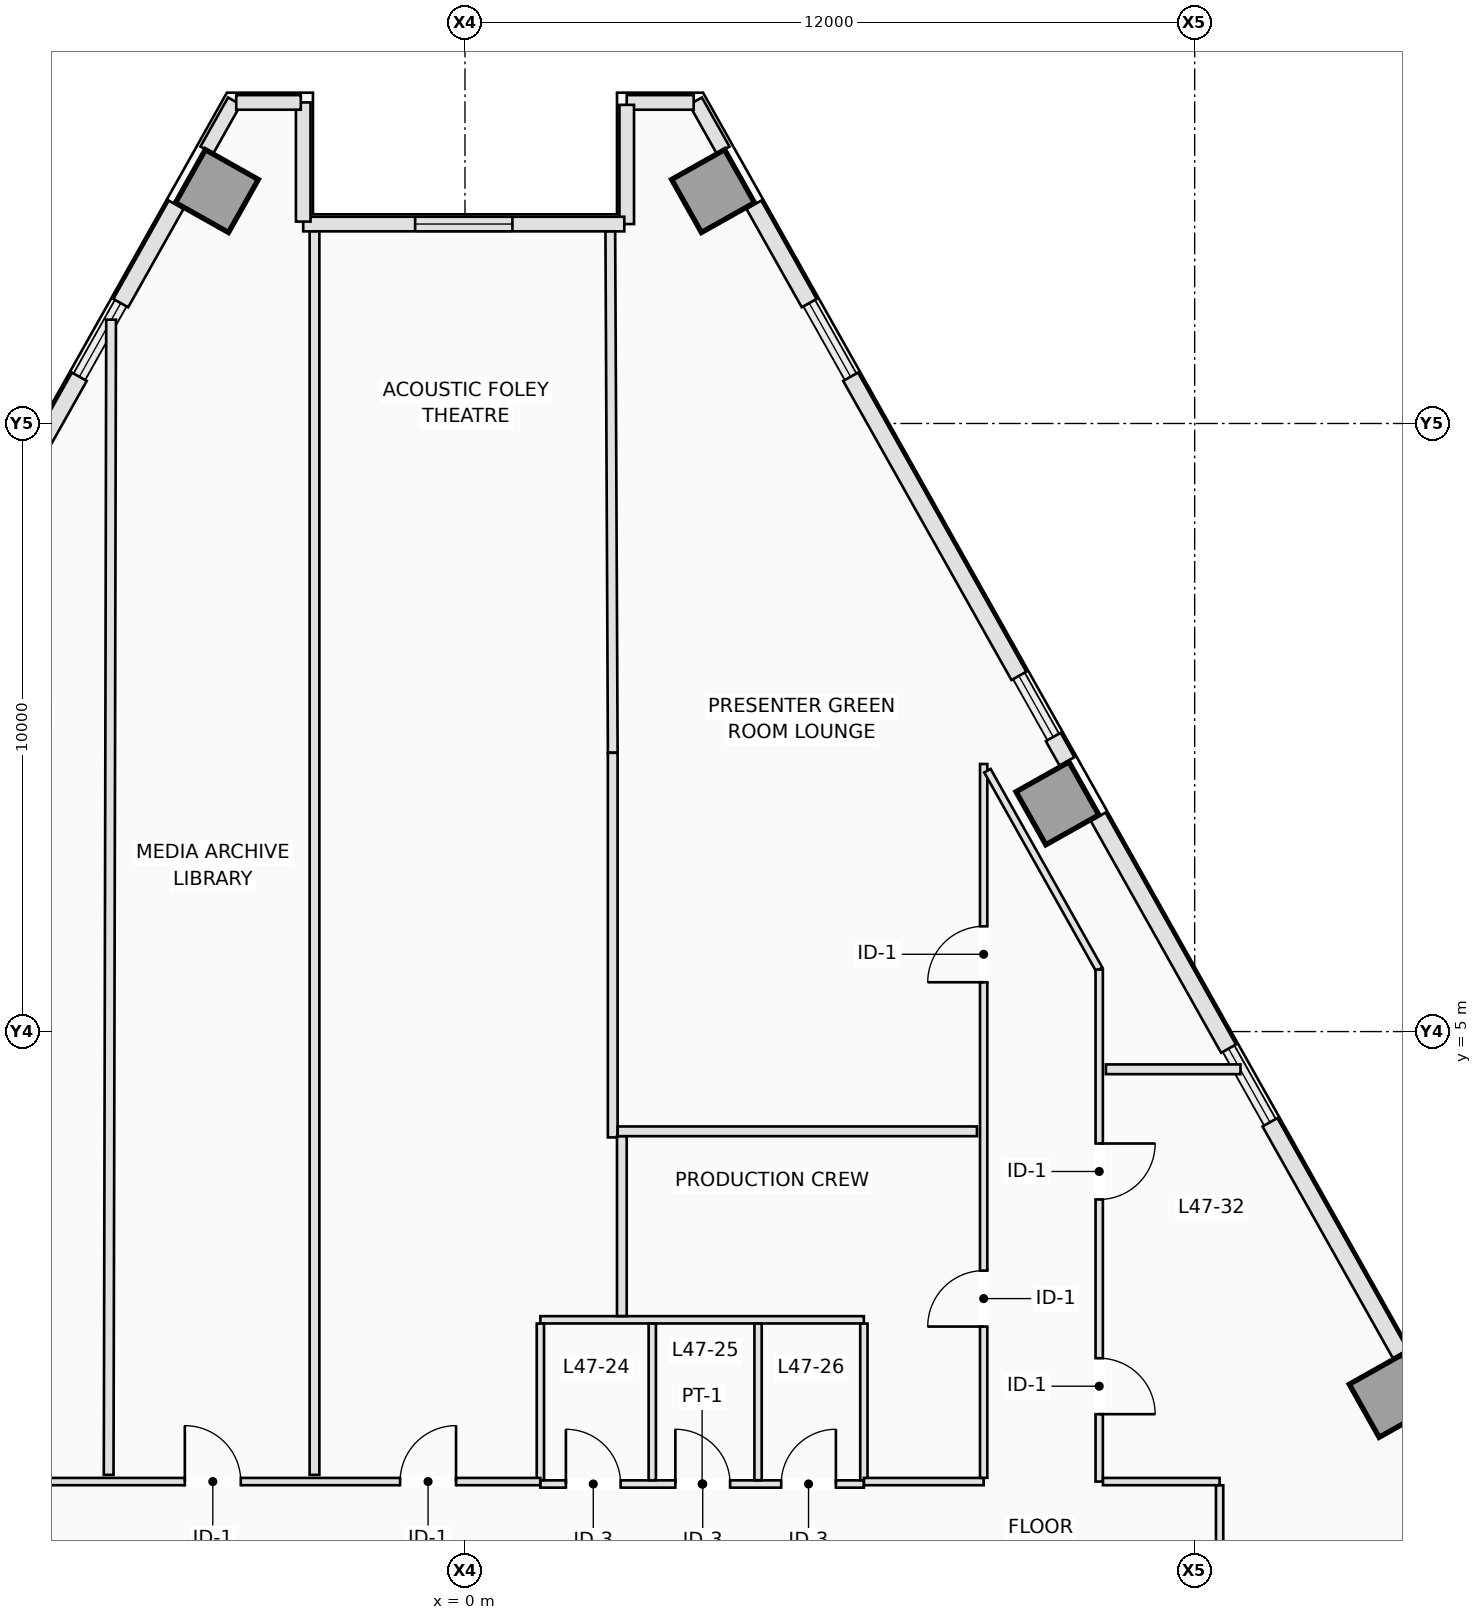
"""IFC4 building model, lengths in metres.
Left out: names, types, materials, properties, quantities, classifications, styles, units other than length and angle.
Written with IfcOpenShell. Run it as: python <this file> out.ifc"""

import sys

from ifc_helpers import new_model, si_unit, direction, frame, frame_2d, origin, origin_2d, place, context, subcontext, project, spatial, rectangle, extrude, element, fill, save


model = new_model("IFC4")
c1 = context("Model", 3, precision=1e-05, world=origin(), true_north=direction((0.0, 1.0)))
c2 = subcontext(c1, "Body", "Model", "MODEL_VIEW")
j1 = project(units=[si_unit("LENGTHUNIT", "METRE"), si_unit("PLANEANGLEUNIT", "RADIAN")], contexts=[c1])
p1 = place(None, origin())
s1 = spatial("IfcSite", under=j1, at=p1, CompositionType="ELEMENT")
p2 = place(p1, origin())
s2 = spatial("IfcBuilding", under=s1, at=p2, CompositionType="ELEMENT")
p3 = place(p2, frame((0.0, 0.0, 172.0)))
s3 = spatial("IfcBuildingStorey", under=s2, at=p3, CompositionType="ELEMENT", Elevation=172.0)
for number, where, z_axis, x_axis in (
    (1, (15.224, -0.991, 0.0), (0.0, 0.0, 1.0), (0.872, 0.49, 0.0)),
    (2, (9.743, 8.753, 0.0), (0.0, 0.0, 1.0), (0.872, 0.49, 0.0)),
    (3, (4.079, 18.822, 0.0), (0.0, 0.0, 1.0), (0.872, 0.49, 0.0)),
    (4, (-4.079, 18.822, 0.0), (0.0, 0.0, 1.0), (-0.872, 0.49, 0.0)),
):
    element("IfcColumn", number, at=place(p3, frame(where, z_axis=z_axis, x_axis=x_axis)), inside=s3, PredefinedType="COLUMN", context=c2, shape_type="SweptSolid", body=[
        extrude(rectangle(XDim=1.0, YDim=1.0, at=origin_2d()), origin(), (0.0, 0.0, 1.0), 3.5),
    ])
p4 = place(p3, frame((3.792, 20.302, 0.0), z_axis=(0.0, 0.0, 1.0), x_axis=(0.490048346303, -0.871695255399, 0.0)))
e5 = element("IfcWall", 5, at=p4, inside=s3, PredefinedType="STANDARD", context=c2, shape_type="SweptSolid", body=[
    extrude(rectangle(XDim=0.926, YDim=0.24, at=frame_2d((0.463, 0.0))), origin(), (0.0, 0.0, 1.0), 3.25),
])
p5 = place(p3, frame((4.751, 18.597, 0.0), z_axis=(0.0, 0.0, 1.0), x_axis=(0.490248749158, -0.871582562899, 0.0)))
e6 = element("IfcWall", 6, at=p5, inside=s3, PredefinedType="STANDARD", context=c2, shape_type="SweptSolid", body=[
    extrude(rectangle(XDim=1.856, YDim=0.28, at=frame_2d((0.928, 0.0))), origin(), (0.0, 0.0, 1.0), 3.25),
])
p6 = place(p3, frame((6.342, 15.768, 0.0), z_axis=(0.0, 0.0, 1.0), x_axis=(0.490289995219, -0.871559361483, 0.0)))
e7 = element("IfcWall", 7, at=p6, inside=s3, PredefinedType="STANDARD", context=c2, shape_type="SweptSolid", body=[
    extrude(rectangle(XDim=5.643, YDim=0.28, at=frame_2d((2.822, 0.0))), origin(), (0.0, 0.0, 1.0), 3.25),
])
p7 = place(p3, frame((9.674, 9.845, 0.0), z_axis=(0.0, 0.0, 1.0), x_axis=(0.490412424957, -0.871490478116, 0.0)))
e8 = element("IfcWall", 8, at=p7, inside=s3, PredefinedType="STANDARD", context=c2, shape_type="SweptSolid", body=[
    extrude(rectangle(XDim=0.46, YDim=0.28, at=frame_2d((0.23, 0.0))), origin(), (0.0, 0.0, 1.0), 3.25),
])
p8 = place(p3, frame((10.412, 8.533, 0.0), z_axis=(0.0, 0.0, 1.0), x_axis=(0.490274486291, -0.871568085747, 0.0)))
e9 = element("IfcWall", 9, at=p8, inside=s3, PredefinedType="STANDARD", context=c2, shape_type="SweptSolid", body=[
    extrude(rectangle(XDim=4.375, YDim=0.28, at=frame_2d((2.188, 0.0))), origin(), (0.0, 0.0, 1.0), 3.25),
])
p9 = place(p3, frame((13.238, 3.509, 0.0), z_axis=(0.0, 0.0, 1.0), x_axis=(0.490232095789, -0.871591929895, 0.0)))
e10 = element("IfcWall", 10, at=p9, inside=s3, PredefinedType="STANDARD", context=c2, shape_type="SweptSolid", body=[
    extrude(rectangle(XDim=4.375, YDim=0.28, at=frame_2d((2.188, 0.0))), origin(), (0.0, 0.0, 1.0), 3.25),
])
p10 = place(p3, frame((-4.246, 19.495, 0.0), z_axis=(0.0, 0.0, 1.0), x_axis=(0.490048346303, 0.871695255399, 0.0)))
e11 = element("IfcWall", 11, at=p10, inside=s3, PredefinedType="STANDARD", context=c2, shape_type="SweptSolid", body=[
    extrude(rectangle(XDim=0.926, YDim=0.24, at=frame_2d((0.463, 0.0))), origin(), (0.0, 0.0, 1.0), 3.25),
])
p11 = place(p3, frame((-9.109, 10.85, 0.0), z_axis=(0.0, 0.0, 1.0), x_axis=(0.490289995219, 0.871559361483, 0.0)))
e12 = element("IfcWall", 12, at=p11, inside=s3, PredefinedType="STANDARD", context=c2, shape_type="SweptSolid", body=[
    extrude(rectangle(XDim=5.643, YDim=0.28, at=frame_2d((2.822, 0.0))), origin(), (0.0, 0.0, 1.0), 3.25),
])
p12 = place(p3, frame((-5.661, 16.98, 0.0), z_axis=(0.0, 0.0, 1.0), x_axis=(0.490248749158, 0.871582562899, 0.0)))
e13 = element("IfcWall", 13, at=p12, inside=s3, PredefinedType="STANDARD", context=c2, shape_type="SweptSolid", body=[
    extrude(rectangle(XDim=1.856, YDim=0.28, at=frame_2d((0.928, 0.0))), origin(), (0.0, 0.0, 1.0), 3.25),
])
p13 = place(p3, frame((3.761, 20.28, 0.0), z_axis=(0.0, 0.0, 1.0), x_axis=(-1.0, 0.0, 0.0)))
e14 = element("IfcWall", 14, at=p13, inside=s3, PredefinedType="STANDARD", context=c2, shape_type="SweptSolid", body=[
    extrude(rectangle(XDim=1.102, YDim=0.24, at=frame_2d((0.551, 0.0))), origin(), (0.0, 0.0, 1.0), 3.25),
])
p14 = place(p3, frame((2.66, 20.24, 0.0), z_axis=(0.0, 0.0, 1.0), x_axis=(0.0, -1.0, 0.0)))
e15 = element("IfcWall", 15, at=p14, inside=s3, PredefinedType="STANDARD", context=c2, shape_type="SweptSolid", body=[
    extrude(rectangle(XDim=1.96, YDim=0.24, at=frame_2d((0.98, 0.0))), origin(), (0.0, 0.0, 1.0), 3.25),
])
p15 = place(p3, frame((2.62, 18.28, 0.0), z_axis=(0.0, 0.0, 1.0), x_axis=(-1.0, 0.0, 0.0)))
e16 = element("IfcWall", 16, at=p15, inside=s3, PredefinedType="STANDARD", context=c2, shape_type="SweptSolid", body=[
    extrude(rectangle(XDim=5.28, YDim=0.24, at=frame_2d((2.64, 0.0))), origin(), (0.0, 0.0, 1.0), 3.25),
])
p16 = place(p15, frame((1.84, 0.0, 0.9)))
e17 = element("IfcOpeningElement", 17, at=p16, cuts=e16, PredefinedType="OPENING", context=c2, shape_type="SweptSolid", body=[
    extrude(rectangle(XDim=1.6, YDim=2.1, at=frame_2d((0.8, 1.05))), frame((0.0, 0.13, 0.0), z_axis=(0.0, -1.0, 0.0), x_axis=(1.0, 0.0, 0.0)), (0.0, 0.0, 1.0), 0.26),
])
p17 = place(p3, frame((-2.66, 18.32, 0.0), z_axis=(0.0, 0.0, 1.0), x_axis=(0.0, 1.0, 0.0)))
e18 = element("IfcWall", 18, at=p17, inside=s3, PredefinedType="STANDARD", context=c2, shape_type="SweptSolid", body=[
    extrude(rectangle(XDim=1.96, YDim=0.24, at=frame_2d((0.98, 0.0))), origin(), (0.0, 0.0, 1.0), 3.25),
])
p18 = place(p3, frame((-2.7, 20.28, 0.0), z_axis=(0.0, 0.0, 1.0), x_axis=(-1.0, 0.0, 0.0)))
e19 = element("IfcWall", 19, at=p18, inside=s3, PredefinedType="STANDARD", context=c2, shape_type="SweptSolid", body=[
    extrude(rectangle(XDim=1.062, YDim=0.24, at=frame_2d((0.531, 0.0))), origin(), (0.0, 0.0, 1.0), 3.25),
])
p19 = place(p3, frame((1.24, -2.44, 0.0), z_axis=(0.0, 0.0, 1.0), x_axis=(1.0, 0.0, 0.0)))
e20 = element("IfcWall", 20, at=p19, inside=s3, PredefinedType="PARTITIONING", context=c2, shape_type="SweptSolid", body=[
    extrude(rectangle(XDim=5.32, YDim=0.12, at=frame_2d((2.66, 0.0))), origin(), (0.0, 0.0, 1.0), 2.891),
])
p20 = place(p19, frame((0.42, 0.0, 0.0)))
e21 = element("IfcOpeningElement", 21, at=p20, cuts=e20, PredefinedType="OPENING", context=c2, shape_type="SweptSolid", body=[
    extrude(rectangle(XDim=0.9, YDim=2.12, at=frame_2d((0.45, 1.06))), frame((0.0, 0.07, 0.0), z_axis=(0.0, -1.0, 0.0), x_axis=(1.0, 0.0, 0.0)), (0.0, 0.0, 1.0), 0.14),
])
p21 = place(p19, frame((2.22, 0.0, 0.0)))
e22 = element("IfcOpeningElement", 22, at=p21, cuts=e20, PredefinedType="OPENING", context=c2, shape_type="SweptSolid", body=[
    extrude(rectangle(XDim=0.9, YDim=2.12, at=frame_2d((0.45, 1.06))), frame((0.0, 0.07, 0.0), z_axis=(0.0, -1.0, 0.0), x_axis=(1.0, 0.0, 0.0)), (0.0, 0.0, 1.0), 0.14),
])
p22 = place(p19, frame((3.96, 0.0, 0.0)))
e23 = element("IfcOpeningElement", 23, at=p22, cuts=e20, PredefinedType="OPENING", context=c2, shape_type="SweptSolid", body=[
    extrude(rectangle(XDim=0.9, YDim=2.12, at=frame_2d((0.45, 1.06))), frame((0.0, 0.07, 0.0), z_axis=(0.0, -1.0, 0.0), x_axis=(1.0, 0.0, 0.0)), (0.0, 0.0, 1.0), 0.14),
])
p23 = place(p3, frame((1.24, 0.26, 0.0), z_axis=(0.0, 0.0, 1.0), x_axis=(1.0, 0.0, 0.0)))
e24 = element("IfcWall", 24, at=p23, inside=s3, PredefinedType="PARTITIONING", context=c2, shape_type="SweptSolid", body=[
    extrude(rectangle(XDim=5.32, YDim=0.12, at=frame_2d((2.66, 0.0))), origin(), (0.0, 0.0, 1.0), 3.25),
])
for number, where, z_axis, x_axis in (
    (25, (1.24, -2.378, 0.0), (0.0, 0.0, 1.0), (0.0, 1.0, 0.0)),
    (26, (3.08, -2.378, 0.0), (0.0, 0.0, 1.0), (0.0, 1.0, 0.0)),
    (27, (4.82, -2.378, 0.0), (0.0, 0.0, 1.0), (0.0, 1.0, 0.0)),
    (28, (6.56, -2.378, 0.0), (0.0, 0.0, 1.0), (0.0, 1.0, 0.0)),
):
    element("IfcWall", number, at=place(p3, frame(where, z_axis=z_axis, x_axis=x_axis)), inside=s3, PredefinedType="PARTITIONING", context=c2, shape_type="SweptSolid", body=[
        extrude(rectangle(XDim=2.576, YDim=0.12, at=frame_2d((1.288, 0.0))), origin(), (0.0, 0.0, 1.0), 3.25),
    ])
p24 = place(p3, frame((-8.408, -2.4, 0.0), z_axis=(0.0, 0.0, 1.0), x_axis=(1.0, 0.0, 0.0)))
e29 = element("IfcWall", 29, at=p24, inside=s3, PredefinedType="PARTITIONING", context=c2, shape_type="SweptSolid", body=[
    extrude(rectangle(XDim=9.646, YDim=0.12, at=frame_2d((4.823, 0.0))), origin(), (0.0, 0.0, 1.0), 2.891),
])
p25 = place(p24, frame((7.341, 0.0, 0.0)))
e30 = element("IfcOpeningElement", 30, at=p25, cuts=e29, PredefinedType="OPENING", context=c2, shape_type="SweptSolid", body=[
    extrude(rectangle(XDim=0.92, YDim=2.12, at=frame_2d((0.46, 1.06))), frame((0.0, 0.07, 0.0), z_axis=(0.0, -1.0, 0.0), x_axis=(1.0, 0.0, 0.0)), (0.0, 0.0, 1.0), 0.14),
])
p26 = place(p24, frame((3.801, 0.0, 0.0)))
e31 = element("IfcOpeningElement", 31, at=p26, cuts=e29, PredefinedType="OPENING", context=c2, shape_type="SweptSolid", body=[
    extrude(rectangle(XDim=0.92, YDim=2.12, at=frame_2d((0.46, 1.06))), frame((0.0, 0.07, 0.0), z_axis=(0.0, -1.0, 0.0), x_axis=(1.0, 0.0, 0.0)), (0.0, 0.0, 1.0), 0.14),
])
p27 = place(p3, frame((6.562, -2.4, 0.0), z_axis=(0.0, 0.0, 1.0), x_axis=(1.0, 0.0, 0.0)))
e32 = element("IfcWall", 32, at=p27, inside=s3, PredefinedType="PARTITIONING", context=c2, shape_type="SweptSolid", body=[
    extrude(rectangle(XDim=1.968, YDim=0.12, at=frame_2d((0.984, 0.0))), origin(), (0.0, 0.0, 1.0), 3.25),
])
p28 = place(p3, frame((8.53, -2.338, 0.0), z_axis=(0.0, 0.0, 1.0), x_axis=(0.0, 1.0, 0.0)))
e33 = element("IfcWall", 33, at=p28, inside=s3, PredefinedType="PARTITIONING", context=c2, shape_type="SweptSolid", body=[
    extrude(rectangle(XDim=11.738, YDim=0.12, at=frame_2d((5.869, 0.0))), origin(), (0.0, 0.0, 1.0), 3.25),
])
p29 = place(p28, frame((8.149, 0.0, 0.0)))
e34 = element("IfcOpeningElement", 34, at=p29, cuts=e33, PredefinedType="OPENING", context=c2, shape_type="SweptSolid", body=[
    extrude(rectangle(XDim=0.92, YDim=2.12, at=frame_2d((0.46, 1.06))), frame((0.0, 0.07, 0.0), z_axis=(0.0, -1.0, 0.0), x_axis=(1.0, 0.0, 0.0)), (0.0, 0.0, 1.0), 0.14),
])
p30 = place(p28, frame((2.487, 0.0, 0.0)))
e35 = element("IfcOpeningElement", 35, at=p30, cuts=e33, PredefinedType="OPENING", context=c2, shape_type="SweptSolid", body=[
    extrude(rectangle(XDim=0.92, YDim=2.12, at=frame_2d((0.46, 1.06))), frame((0.0, 0.07, 0.0), z_axis=(0.0, -1.0, 0.0), x_axis=(1.0, 0.0, 0.0)), (0.0, 0.0, 1.0), 0.14),
])
p31 = place(p3, frame((8.592, 9.29, 0.0), z_axis=(0.0, 0.0, 1.0), x_axis=(0.490264331639, -0.871573797864, 0.0)))
e36 = element("IfcWall", 36, at=p31, inside=s3, PredefinedType="PARTITIONING", context=c2, shape_type="SweptSolid", body=[
    extrude(rectangle(XDim=3.749, YDim=0.12, at=frame_2d((1.875, 0.0))), origin(), (0.0, 0.0, 1.0), 3.25),
])
p32 = place(p3, frame((10.43, 6.02, 0.0), z_axis=(0.0, 0.0, 1.0), x_axis=(0.0, -1.0, 0.0)))
e37 = element("IfcWall", 37, at=p32, inside=s3, PredefinedType="PARTITIONING", context=c2, shape_type="SweptSolid", body=[
    extrude(rectangle(XDim=8.42, YDim=0.12, at=frame_2d((4.21, 0.0))), origin(), (0.0, 0.0, 1.0), 3.25),
])
p33 = place(p32, frame((2.861, 0.0, 0.0)))
e38 = element("IfcOpeningElement", 38, at=p33, cuts=e37, PredefinedType="OPENING", context=c2, shape_type="SweptSolid", body=[
    extrude(rectangle(XDim=0.92, YDim=2.12, at=frame_2d((0.46, 1.06))), frame((0.0, 0.07, 0.0), z_axis=(0.0, -1.0, 0.0), x_axis=(1.0, 0.0, 0.0)), (0.0, 0.0, 1.0), 0.14),
])
p34 = place(p32, frame((6.392, 0.0, 0.0)))
e39 = element("IfcOpeningElement", 39, at=p34, cuts=e37, PredefinedType="OPENING", context=c2, shape_type="SweptSolid", body=[
    extrude(rectangle(XDim=0.92, YDim=2.12, at=frame_2d((0.46, 1.06))), frame((0.0, 0.07, 0.0), z_axis=(0.0, -1.0, 0.0), x_axis=(1.0, 0.0, 0.0)), (0.0, 0.0, 1.0), 0.14),
])
p35 = place(p3, frame((10.492, -2.4, 0.0), z_axis=(0.0, 0.0, 1.0), x_axis=(1.0, 0.0, 0.0)))
e40 = element("IfcWall", 40, at=p35, inside=s3, PredefinedType="PARTITIONING", context=c2, shape_type="SweptSolid", body=[
    extrude(rectangle(XDim=1.918, YDim=0.12, at=frame_2d((0.959, 0.0))), origin(), (0.0, 0.0, 1.0), 3.25),
])
p36 = place(p3, frame((12.41, -2.462, 0.0), z_axis=(0.0, 0.0, 1.0), x_axis=(0.0, -1.0, 0.0)))
e41 = element("IfcWall", 41, at=p36, inside=s3, PredefinedType="PARTITIONING", context=c2, shape_type="SweptSolid", body=[
    extrude(rectangle(XDim=1.786, YDim=0.12, at=frame_2d((0.893, 0.0))), origin(), (0.0, 0.0, 1.0), 3.25),
])
p37 = place(p3, frame((2.43, 9.586, 0.0), z_axis=(0.0, 0.0, 1.0), x_axis=(-0.004699597763, 0.999988956829, 0.0)))
e42 = element("IfcWall", 42, at=p37, inside=s3, PredefinedType="PARTITIONING", context=c2, shape_type="SweptSolid", body=[
    extrude(rectangle(XDim=8.572, YDim=0.16, at=frame_2d((4.286, 0.0))), origin(), (0.0, 0.0, 1.0), 3.25),
])
p38 = place(p3, frame((2.43, 3.26, 0.0), z_axis=(0.0, 0.0, 1.0), x_axis=(0.0, 1.0, 0.0)))
e43 = element("IfcWall", 43, at=p38, inside=s3, PredefinedType="PARTITIONING", context=c2, shape_type="SweptSolid", body=[
    extrude(rectangle(XDim=6.325, YDim=0.16, at=frame_2d((3.162, 0.0))), origin(), (0.0, 0.0, 1.0), 3.25),
])
p39 = place(p3, frame((12.754, 4.38, 0.0), z_axis=(0.0, 0.0, 1.0), x_axis=(-1.0, 0.0, 0.0)))
e44 = element("IfcWall", 44, at=p39, inside=s3, PredefinedType="PARTITIONING", context=c2, shape_type="SweptSolid", body=[
    extrude(rectangle(XDim=2.214, YDim=0.16, at=frame_2d((1.107, 0.0))), origin(), (0.0, 0.0, 1.0), 3.25),
])
p40 = place(p3, frame((8.42, 3.36, 0.0), z_axis=(0.0, 0.0, 1.0), x_axis=(-1.0, 0.0, 0.0)))
e45 = element("IfcWall", 45, at=p40, inside=s3, PredefinedType="PARTITIONING", context=c2, shape_type="SweptSolid", body=[
    extrude(rectangle(XDim=5.908, YDim=0.16, at=frame_2d((2.954, 0.0))), origin(), (0.0, 0.0, 1.0), 2.891),
])
p41 = place(p3, frame((-2.475, -2.29, 0.0), z_axis=(0.0, 0.0, 1.0), x_axis=(0.0, 1.0, 0.0)))
e46 = element("IfcWall", 46, at=p41, inside=s3, PredefinedType="PARTITIONING", context=c2, shape_type="SweptSolid", body=[
    extrude(rectangle(XDim=20.448, YDim=0.16, at=frame_2d((10.224, 0.0))), origin(), (0.0, 0.0, 1.0), 3.25),
])
p42 = place(p3, frame((2.58, 3.278, 0.0), z_axis=(0.0, 0.0, 1.0), x_axis=(0.0, -1.0, 0.0)))
e47 = element("IfcWall", 47, at=p42, inside=s3, PredefinedType="PARTITIONING", context=c2, shape_type="SweptSolid", body=[
    extrude(rectangle(XDim=2.956, YDim=0.16, at=frame_2d((1.478, 0.0))), origin(), (0.0, 0.0, 1.0), 3.25),
])
p43 = place(p3, frame((-5.86, -2.29, 0.0), z_axis=(0.0, 0.0, 1.0), x_axis=(0.002107612298, 0.999997778983, 0.0)))
e48 = element("IfcWall", 48, at=p43, inside=s3, PredefinedType="PARTITIONING", context=c2, shape_type="SweptSolid", body=[
    extrude(rectangle(XDim=18.997, YDim=0.16, at=frame_2d((9.499, 0.0))), origin(), (0.0, 0.0, 1.0), 3.25),
])
p44 = place(p16, origin())
e49 = element("IfcWindow", 49, at=p44, inside=s3, PartitioningType="SINGLE_PANEL", PredefinedType="WINDOW", context=c2, shape_type="SweptSolid", body=[
    extrude(rectangle(XDim=1.6, YDim=2.1, at=frame_2d((0.8, 1.05))), frame((0.0, 0.03, 0.0), z_axis=(0.0, -1.0, 0.0), x_axis=(1.0, 0.0, 0.0)), (0.0, 0.0, 1.0), 0.06),
])
fill(e17, e49)
p45 = place(p20, origin())
e50 = element("IfcDoor", 50, at=p45, inside=s3, OperationType="SINGLE_SWING_LEFT", PredefinedType="DOOR", context=c2, shape_type="SweptSolid", body=[
    extrude(rectangle(XDim=0.9, YDim=2.12, at=frame_2d((0.45, 1.06))), frame((0.0, 0.025, 0.0), z_axis=(0.0, -1.0, 0.0), x_axis=(1.0, 0.0, 0.0)), (0.0, 0.0, 1.0), 0.05),
])
fill(e21, e50)
p46 = place(p21, origin())
e51 = element("IfcDoor", 51, at=p46, inside=s3, OperationType="SINGLE_SWING_LEFT", PredefinedType="DOOR", context=c2, shape_type="SweptSolid", body=[
    extrude(rectangle(XDim=0.9, YDim=2.12, at=frame_2d((0.45, 1.06))), frame((0.0, 0.025, 0.0), z_axis=(0.0, -1.0, 0.0), x_axis=(1.0, 0.0, 0.0)), (0.0, 0.0, 1.0), 0.05),
])
fill(e22, e51)
p47 = place(p22, origin())
e52 = element("IfcDoor", 52, at=p47, inside=s3, OperationType="SINGLE_SWING_RIGHT", PredefinedType="DOOR", context=c2, shape_type="SweptSolid", body=[
    extrude(rectangle(XDim=0.9, YDim=2.12, at=frame_2d((0.45, 1.06))), frame((0.0, 0.025, 0.0), z_axis=(0.0, -1.0, 0.0), x_axis=(1.0, 0.0, 0.0)), (0.0, 0.0, 1.0), 0.05),
])
fill(e23, e52)
p48 = place(p29, origin())
e53 = element("IfcDoor", 53, at=p48, inside=s3, OperationType="SINGLE_SWING_LEFT", PredefinedType="DOOR", context=c2, shape_type="SweptSolid", body=[
    extrude(rectangle(XDim=0.92, YDim=2.12, at=frame_2d((0.46, 1.06))), frame((0.0, 0.025, 0.0), z_axis=(0.0, -1.0, 0.0), x_axis=(1.0, 0.0, 0.0)), (0.0, 0.0, 1.0), 0.05),
])
fill(e34, e53)
p49 = place(p25, origin())
e54 = element("IfcDoor", 54, at=p49, inside=s3, OperationType="SINGLE_SWING_RIGHT", PredefinedType="DOOR", context=c2, shape_type="SweptSolid", body=[
    extrude(rectangle(XDim=0.92, YDim=2.12, at=frame_2d((0.46, 1.06))), frame((0.0, 0.025, 0.0), z_axis=(0.0, -1.0, 0.0), x_axis=(1.0, 0.0, 0.0)), (0.0, 0.0, 1.0), 0.05),
])
fill(e30, e54)
p50 = place(p26, origin())
e55 = element("IfcDoor", 55, at=p50, inside=s3, OperationType="SINGLE_SWING_LEFT", PredefinedType="DOOR", context=c2, shape_type="SweptSolid", body=[
    extrude(rectangle(XDim=0.92, YDim=2.12, at=frame_2d((0.46, 1.06))), frame((0.0, 0.025, 0.0), z_axis=(0.0, -1.0, 0.0), x_axis=(1.0, 0.0, 0.0)), (0.0, 0.0, 1.0), 0.05),
])
fill(e31, e55)
p51 = place(p33, origin())
e56 = element("IfcDoor", 56, at=p51, inside=s3, OperationType="SINGLE_SWING_LEFT", PredefinedType="DOOR", context=c2, shape_type="SweptSolid", body=[
    extrude(rectangle(XDim=0.92, YDim=2.12, at=frame_2d((0.46, 1.06))), frame((0.0, 0.025, 0.0), z_axis=(0.0, -1.0, 0.0), x_axis=(1.0, 0.0, 0.0)), (0.0, 0.0, 1.0), 0.05),
])
fill(e38, e56)
p52 = place(p30, origin())
e57 = element("IfcDoor", 57, at=p52, inside=s3, OperationType="SINGLE_SWING_LEFT", PredefinedType="DOOR", context=c2, shape_type="SweptSolid", body=[
    extrude(rectangle(XDim=0.92, YDim=2.12, at=frame_2d((0.46, 1.06))), frame((0.0, 0.025, 0.0), z_axis=(0.0, -1.0, 0.0), x_axis=(1.0, 0.0, 0.0)), (0.0, 0.0, 1.0), 0.05),
])
fill(e35, e57)
p53 = place(p34, origin())
e58 = element("IfcDoor", 58, at=p53, inside=s3, OperationType="SINGLE_SWING_RIGHT", PredefinedType="DOOR", context=c2, shape_type="SweptSolid", body=[
    extrude(rectangle(XDim=0.92, YDim=2.12, at=frame_2d((0.46, 1.06))), frame((0.0, 0.025, 0.0), z_axis=(0.0, -1.0, 0.0), x_axis=(1.0, 0.0, 0.0)), (0.0, 0.0, 1.0), 0.05),
])
fill(e39, e58)
save(model, sys.argv[1])
